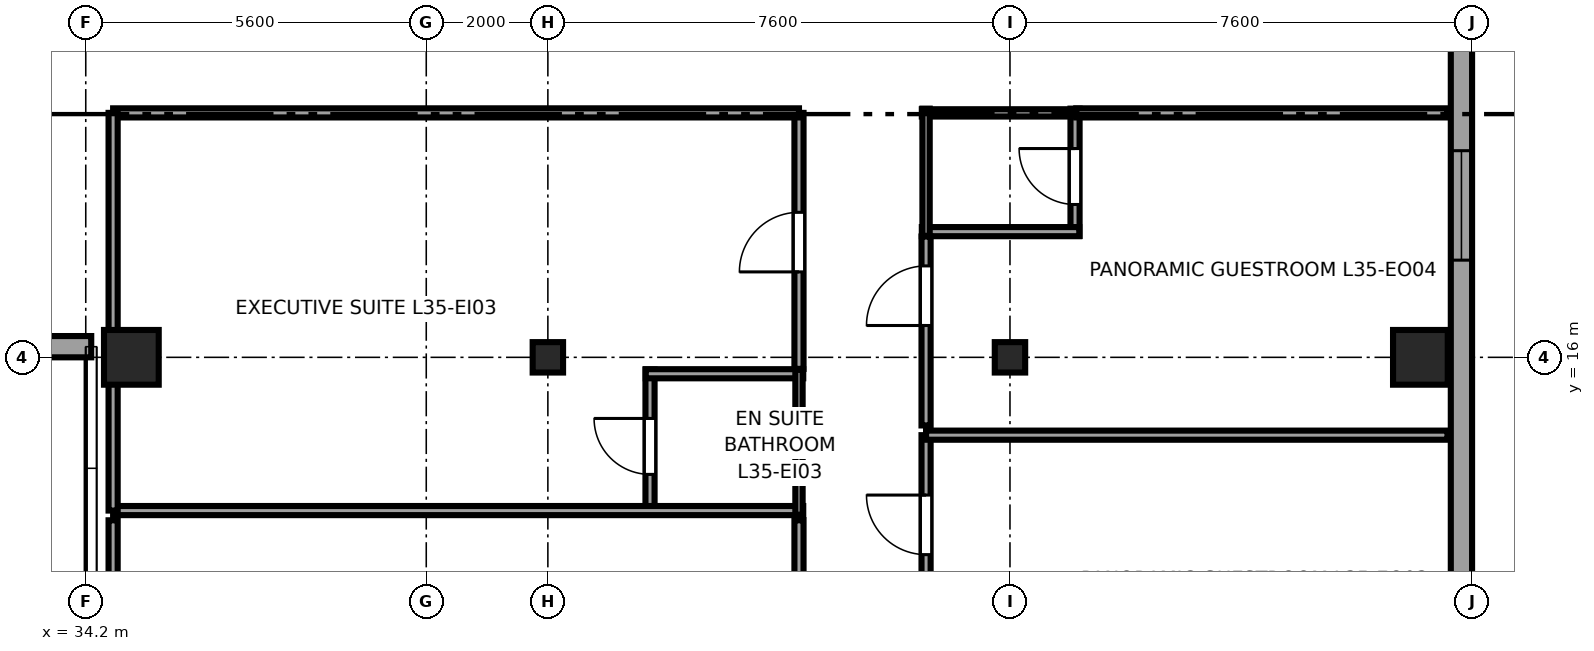
"""IFC4 building model, lengths in metres.
Left out: names, types, materials, properties, quantities, classifications, styles, units other than length and angle.
Written with IfcOpenShell. Run it as: python <this file> out.ifc"""

import sys

from ifc_helpers import new_model, si_unit, direction, frame, frame_2d, origin, origin_2d, place, context, subcontext, project, spatial, rectangle, i_section, extrude, source, transform, mapped, element, fill, save


model = new_model("IFC4")
c1 = context("Model", 3, precision=1e-05, world=origin(), true_north=direction((0.0, 1.0)))
c2 = subcontext(c1, "Body", "Model", "MODEL_VIEW")
j1 = project(units=[si_unit("LENGTHUNIT", "METRE"), si_unit("PLANEANGLEUNIT", "RADIAN")], contexts=[c1])
p1 = place(None, origin())
s1 = spatial("IfcSite", under=j1, at=p1, CompositionType="ELEMENT")
p2 = place(p1, origin())
s2 = spatial("IfcBuilding", under=s1, at=p2, CompositionType="ELEMENT")
p3 = place(p2, frame((0.0, 0.0, 136.4)))
s3 = spatial("IfcBuildingStorey", under=s2, at=p3, CompositionType="ELEMENT", Elevation=136.4)
m1 = source(origin(), c2, "Body", "SweptSolid", [
    extrude(rectangle(XDim=0.9, YDim=0.9, at=origin_2d()), origin(), (0.0, 0.0, 1.0), 3.55),
])
p4 = place(p3, frame((34.95, 16.0, 0.0), z_axis=(0.0, 0.0, 1.0), x_axis=(1.0, 0.0, 0.0)))
e1 = element("IfcColumn", 1, at=p4, inside=s3, PredefinedType="COLUMN", context=c2, shape_type="MappedRepresentation", body=[
    mapped(m1, transform((0.0, 0.0, 0.0), x_axis=(1.0, 0.0, 0.0), y_axis=(0.0, 1.0, 0.0), z_axis=(0.0, 0.0, 1.0), scale=1.0)),
])
m2 = source(origin(), c2, "Body", "SweptSolid", [
    extrude(i_section(OverallWidth=0.5, OverallDepth=0.5, WebThickness=0.022, FlangeThickness=0.034, at=origin_2d()), origin(), (0.0, 0.0, 1.0), 3.55),
])
for number, where, z_axis, x_axis in (
    (2, (41.8, 16.0, 0.0), (0.0, 0.0, 1.0), (1.0, 0.0, 0.0)),
    (3, (49.4, 16.0, 0.0), (0.0, 0.0, 1.0), (1.0, 0.0, 0.0)),
):
    element("IfcColumn", number, at=place(p3, frame(where, z_axis=z_axis, x_axis=x_axis)), inside=s3, PredefinedType="COLUMN", context=c2, shape_type="MappedRepresentation", body=[
        mapped(m2, transform((0.0, 0.0, 0.0), x_axis=(1.0, 0.0, 0.0), y_axis=(0.0, 1.0, 0.0), z_axis=(0.0, 0.0, 1.0), scale=1.0)),
    ])
p5 = place(p3, frame((56.15, 16.0, 0.0), z_axis=(0.0, 0.0, 1.0), x_axis=(1.0, 0.0, 0.0)))
e4 = element("IfcColumn", 4, at=p5, inside=s3, PredefinedType="COLUMN", context=c2, shape_type="MappedRepresentation", body=[
    mapped(m1, transform((0.0, 0.0, 0.0), x_axis=(1.0, 0.0, 0.0), y_axis=(0.0, 1.0, 0.0), z_axis=(0.0, 0.0, 1.0), scale=1.0)),
])
p6 = place(p3, frame((22.71, 16.175, 0.0), z_axis=(0.0, 0.0, 1.0), x_axis=(1.0, 0.0, 0.0)))
e5 = element("IfcWall", 5, at=p6, inside=s3, PredefinedType="SOLIDWALL", context=c2, shape_type="SweptSolid", body=[
    extrude(rectangle(XDim=11.58, YDim=0.35, at=frame_2d((5.79, 0.0))), origin(), (0.0, 0.0, 1.0), 2.748),
])
p7 = place(p6, frame((2.295, 0.0, 0.68)))
e6 = element("IfcOpeningElement", 6, at=p7, cuts=e5, PredefinedType="OPENING", context=c2, shape_type="SweptSolid", body=[
    extrude(rectangle(XDim=1.8, YDim=1.85, at=frame_2d((0.9, 0.925))), frame((0.0, 0.185, 0.0), z_axis=(0.0, -1.0, 0.0), x_axis=(1.0, 0.0, 0.0)), (0.0, 0.0, 1.0), 0.37),
])
p8 = place(p6, frame((7.485, 0.0, 0.68)))
e7 = element("IfcOpeningElement", 7, at=p8, cuts=e5, PredefinedType="OPENING", context=c2, shape_type="SweptSolid", body=[
    extrude(rectangle(XDim=1.8, YDim=1.85, at=frame_2d((0.9, 0.925))), frame((0.0, 0.185, 0.0), z_axis=(0.0, -1.0, 0.0), x_axis=(1.0, 0.0, 0.0)), (0.0, 0.0, 1.0), 0.37),
])
p9 = place(p3, frame((56.825, 4.617, 0.0), z_axis=(0.0, 0.0, 1.0), x_axis=(0.0, 1.0, 0.0)))
e8 = element("IfcWall", 8, at=p9, inside=s3, PredefinedType="SOLIDWALL", context=c2, shape_type="SweptSolid", body=[
    extrude(rectangle(XDim=36.766, YDim=0.35, at=frame_2d((18.383, 0.0))), origin(), (0.0, 0.0, 1.0), 3.37),
])
p10 = place(p9, frame((0.626, 0.0, 0.68)))
e9 = element("IfcOpeningElement", 9, at=p10, cuts=e8, PredefinedType="OPENING", context=c2, shape_type="SweptSolid", body=[
    extrude(rectangle(XDim=1.8, YDim=1.85, at=frame_2d((0.9, 0.925))), frame((0.0, 0.185, 0.0), z_axis=(0.0, -1.0, 0.0), x_axis=(1.0, 0.0, 0.0)), (0.0, 0.0, 1.0), 0.37),
])
p11 = place(p9, frame((5.628, 0.0, 0.68)))
e10 = element("IfcOpeningElement", 10, at=p11, cuts=e8, PredefinedType="OPENING", context=c2, shape_type="SweptSolid", body=[
    extrude(rectangle(XDim=1.8, YDim=1.85, at=frame_2d((0.9, 0.925))), frame((0.0, 0.185, 0.0), z_axis=(0.0, -1.0, 0.0), x_axis=(1.0, 0.0, 0.0)), (0.0, 0.0, 1.0), 0.37),
])
p12 = place(p9, frame((12.981, 0.0, 0.68)))
e11 = element("IfcOpeningElement", 11, at=p12, cuts=e8, PredefinedType="OPENING", context=c2, shape_type="SweptSolid", body=[
    extrude(rectangle(XDim=1.8, YDim=1.85, at=frame_2d((0.9, 0.925))), frame((0.0, 0.185, 0.0), z_axis=(0.0, -1.0, 0.0), x_axis=(1.0, 0.0, 0.0)), (0.0, 0.0, 1.0), 0.37),
])
p13 = place(p9, frame((21.435, 0.0, 0.68)))
e12 = element("IfcOpeningElement", 12, at=p13, cuts=e8, PredefinedType="OPENING", context=c2, shape_type="SweptSolid", body=[
    extrude(rectangle(XDim=1.8, YDim=1.85, at=frame_2d((0.9, 0.925))), frame((0.0, 0.185, 0.0), z_axis=(0.0, -1.0, 0.0), x_axis=(1.0, 0.0, 0.0)), (0.0, 0.0, 1.0), 0.37),
])
p14 = place(p9, frame((30.388, 0.0, 0.68)))
e13 = element("IfcOpeningElement", 13, at=p14, cuts=e8, PredefinedType="OPENING", context=c2, shape_type="SweptSolid", body=[
    extrude(rectangle(XDim=1.8, YDim=1.85, at=frame_2d((0.9, 0.925))), frame((0.0, 0.185, 0.0), z_axis=(0.0, -1.0, 0.0), x_axis=(1.0, 0.0, 0.0)), (0.0, 0.0, 1.0), 0.37),
])
p15 = place(p3, frame((43.48, 13.41, 0.0), z_axis=(0.0, 0.0, 1.0), x_axis=(0.0, 1.0, 0.0)))
e14 = element("IfcWall", 14, at=p15, inside=s3, PredefinedType="PARTITIONING", context=c2, shape_type="SweptSolid", body=[
    extrude(rectangle(XDim=2.39, YDim=0.15, at=frame_2d((1.195, 0.0))), origin(), (0.0, 0.0, 1.0), 3.37),
])
p16 = place(p15, frame((0.665, 0.0, 0.0)))
e15 = element("IfcOpeningElement", 15, at=p16, cuts=e14, PredefinedType="OPENING", context=c2, shape_type="SweptSolid", body=[
    extrude(rectangle(XDim=0.92, YDim=2.01, at=frame_2d((0.46, 1.005))), frame((0.0, 0.085, 0.0), z_axis=(0.0, -1.0, 0.0), x_axis=(1.0, 0.0, 0.0)), (0.0, 0.0, 1.0), 0.17),
])
p17 = place(p3, frame((34.65, 13.48, 0.0), z_axis=(0.0, 0.0, 1.0), x_axis=(1.0, 0.0, 0.0)))
e16 = element("IfcWall", 16, at=p17, inside=s3, PredefinedType="PARTITIONING", context=c2, shape_type="SweptSolid", body=[
    extrude(rectangle(XDim=11.35, YDim=0.15, at=frame_2d((5.675, 0.0))), origin(), (0.0, 0.0, 1.0), 3.37),
])
p18 = place(p3, frame((43.41, 15.73, 0.0), z_axis=(0.0, 0.0, 1.0), x_axis=(1.0, 0.0, 0.0)))
e17 = element("IfcWall", 17, at=p18, inside=s3, PredefinedType="PARTITIONING", context=c2, shape_type="SweptSolid", body=[
    extrude(rectangle(XDim=2.59, YDim=0.15, at=frame_2d((1.295, 0.0))), origin(), (0.0, 0.0, 1.0), 3.37),
])
p19 = place(p3, frame((45.93, 13.41, 0.0), z_axis=(0.0, 0.0, 1.0), x_axis=(0.0, 1.0, 0.0)))
e18 = element("IfcWall", 18, at=p19, inside=s3, PredefinedType="PLUMBINGWALL", context=c2, shape_type="SweptSolid", body=[
    extrude(rectangle(XDim=2.39, YDim=0.12, at=frame_2d((1.195, 0.0))), origin(), (0.0, 0.0, 1.0), 3.37),
])
p20 = place(p3, frame((50.47, 17.997, 0.0), z_axis=(0.0, 0.0, 1.0), x_axis=(0.0, 1.0, 0.0)))
e19 = element("IfcWall", 19, at=p20, inside=s3, PredefinedType="PARTITIONING", context=c2, shape_type="SweptSolid", body=[
    extrude(rectangle(XDim=2.093, YDim=0.15, at=frame_2d((1.046, 0.0))), origin(), (0.0, 0.0, 1.0), 3.37),
])
p21 = place(p20, frame((0.517, 0.0, 0.0)))
e20 = element("IfcOpeningElement", 20, at=p21, cuts=e19, PredefinedType="OPENING", context=c2, shape_type="SweptSolid", body=[
    extrude(rectangle(XDim=0.92, YDim=2.01, at=frame_2d((0.46, 1.005))), frame((0.0, 0.085, 0.0), z_axis=(0.0, -1.0, 0.0), x_axis=(1.0, 0.0, 0.0)), (0.0, 0.0, 1.0), 0.17),
])
p22 = place(p3, frame((47.95, 18.067, 0.0), z_axis=(0.0, 0.0, 1.0), x_axis=(1.0, 0.0, 0.0)))
e21 = element("IfcWall", 21, at=p22, inside=s3, PredefinedType="PARTITIONING", context=c2, shape_type="SweptSolid", body=[
    extrude(rectangle(XDim=2.59, YDim=0.15, at=frame_2d((1.295, 0.0))), origin(), (0.0, 0.0, 1.0), 3.37),
])
p23 = place(p3, frame((47.95, 20.02, 0.0), z_axis=(0.0, 0.0, 1.0), x_axis=(1.0, 0.0, 0.0)))
e22 = element("IfcWall", 22, at=p23, inside=s3, PredefinedType="PLUMBINGWALL", context=c2, shape_type="SweptSolid", body=[
    extrude(rectangle(XDim=2.59, YDim=0.12, at=frame_2d((1.295, 0.0))), origin(), (0.0, 0.0, 1.0), 3.37),
])
p24 = place(p3, frame((48.02, 17.997, 0.0), z_axis=(0.0, 0.0, 1.0), x_axis=(0.0, 1.0, 0.0)))
e23 = element("IfcWall", 23, at=p24, inside=s3, PredefinedType="PLUMBINGWALL", context=c2, shape_type="SweptSolid", body=[
    extrude(rectangle(XDim=2.093, YDim=0.12, at=frame_2d((1.046, 0.0))), origin(), (0.0, 0.0, 1.0), 3.37),
])
p25 = place(p3, frame((45.93, 9.01, 0.0), z_axis=(0.0, 0.0, 1.0), x_axis=(0.0, 1.0, 0.0)))
e24 = element("IfcWall", 24, at=p25, inside=s3, PredefinedType="PARTITIONING", context=c2, shape_type="SweptSolid", body=[
    extrude(rectangle(XDim=4.31, YDim=0.15, at=frame_2d((2.155, 0.0))), origin(), (0.0, 0.0, 1.0), 3.37),
])
p26 = place(p25, frame((1.645, 0.0, 0.0)))
e25 = element("IfcOpeningElement", 25, at=p26, cuts=e24, PredefinedType="OPENING", context=c2, shape_type="SweptSolid", body=[
    extrude(rectangle(XDim=0.98, YDim=2.12, at=frame_2d((0.49, 1.06))), frame((0.0, 0.085, 0.0), z_axis=(0.0, -1.0, 0.0), x_axis=(1.0, 0.0, 0.0)), (0.0, 0.0, 1.0), 0.17),
])
p27 = place(p3, frame((34.65, 6.68, 0.0), z_axis=(0.0, 0.0, 1.0), x_axis=(0.0, 1.0, 0.0)))
e26 = element("IfcWall", 26, at=p27, inside=s3, PredefinedType="PARTITIONING", context=c2, shape_type="SweptSolid", body=[
    extrude(rectangle(XDim=6.64, YDim=0.15, at=frame_2d((3.32, 0.0))), origin(), (0.0, 0.0, 1.0), 3.37),
])
p28 = place(p3, frame((45.93, 15.81, 0.0), z_axis=(0.0, 0.0, 1.0), x_axis=(0.0, 1.0, 0.0)))
e27 = element("IfcWall", 27, at=p28, inside=s3, PredefinedType="PARTITIONING", context=c2, shape_type="SweptSolid", body=[
    extrude(rectangle(XDim=4.21, YDim=0.15, at=frame_2d((2.105, 0.0))), origin(), (0.0, 0.0, 1.0), 3.37),
])
p29 = place(p28, frame((1.595, 0.0, 0.0)))
e28 = element("IfcOpeningElement", 28, at=p29, cuts=e27, PredefinedType="OPENING", context=c2, shape_type="SweptSolid", body=[
    extrude(rectangle(XDim=0.98, YDim=2.12, at=frame_2d((0.49, 1.06))), frame((0.0, 0.085, 0.0), z_axis=(0.0, -1.0, 0.0), x_axis=(1.0, 0.0, 0.0)), (0.0, 0.0, 1.0), 0.17),
])
p30 = place(p3, frame((34.65, 20.02, 0.0), z_axis=(0.0, 0.0, 1.0), x_axis=(1.0, 0.0, 0.0)))
e29 = element("IfcWall", 29, at=p30, inside=s3, PredefinedType="PARTITIONING", context=c2, shape_type="SweptSolid", body=[
    extrude(rectangle(XDim=11.28, YDim=0.15, at=frame_2d((5.64, 0.0))), origin(), (0.0, 0.0, 1.0), 2.954),
])
p31 = place(p3, frame((34.65, 13.48, 0.0), z_axis=(0.0, 0.0, 1.0), x_axis=(0.0, 1.0, 0.0)))
e30 = element("IfcWall", 30, at=p31, inside=s3, PredefinedType="PARTITIONING", context=c2, shape_type="SweptSolid", body=[
    extrude(rectangle(XDim=6.54, YDim=0.15, at=frame_2d((3.27, 0.0))), origin(), (0.0, 0.0, 1.0), 3.37),
])
p32 = place(p3, frame((48.02, 11.81, 0.0), z_axis=(0.0, 0.0, 1.0), x_axis=(0.0, 1.0, 0.0)))
e31 = element("IfcWall", 31, at=p32, inside=s3, PredefinedType="PARTITIONING", context=c2, shape_type="SweptSolid", body=[
    extrude(rectangle(XDim=2.91, YDim=0.15, at=frame_2d((1.455, 0.0))), origin(), (0.0, 0.0, 1.0), 3.37),
])
p33 = place(p32, frame((0.945, 0.0, 0.0)))
e32 = element("IfcOpeningElement", 32, at=p33, cuts=e31, PredefinedType="OPENING", context=c2, shape_type="SweptSolid", body=[
    extrude(rectangle(XDim=0.98, YDim=2.12, at=frame_2d((0.49, 1.06))), frame((0.0, 0.085, 0.0), z_axis=(0.0, -1.0, 0.0), x_axis=(1.0, 0.0, 0.0)), (0.0, 0.0, 1.0), 0.17),
])
p34 = place(p3, frame((48.02, 14.72, 0.0), z_axis=(0.0, 0.0, 1.0), x_axis=(1.0, 0.0, 0.0)))
e33 = element("IfcWall", 33, at=p34, inside=s3, PredefinedType="PARTITIONING", context=c2, shape_type="SweptSolid", body=[
    extrude(rectangle(XDim=8.575, YDim=0.15, at=frame_2d((4.288, 0.0))), origin(), (0.0, 0.0, 1.0), 3.37),
])
p35 = place(p3, frame((48.02, 14.88, 0.0), z_axis=(0.0, 0.0, 1.0), x_axis=(0.0, 1.0, 0.0)))
e34 = element("IfcWall", 34, at=p35, inside=s3, PredefinedType="PARTITIONING", context=c2, shape_type="SweptSolid", body=[
    extrude(rectangle(XDim=3.107, YDim=0.15, at=frame_2d((1.554, 0.0))), origin(), (0.0, 0.0, 1.0), 3.37),
])
p36 = place(p35, frame((1.644, 0.0, 0.0)))
e35 = element("IfcOpeningElement", 35, at=p36, cuts=e34, PredefinedType="OPENING", context=c2, shape_type="SweptSolid", body=[
    extrude(rectangle(XDim=0.98, YDim=2.12, at=frame_2d((0.49, 1.06))), frame((0.0, 0.085, 0.0), z_axis=(0.0, -1.0, 0.0), x_axis=(1.0, 0.0, 0.0)), (0.0, 0.0, 1.0), 0.17),
])
p37 = place(p3, frame((50.49, 20.02, 0.0), z_axis=(0.0, 0.0, 1.0), x_axis=(1.0, 0.0, 0.0)))
e36 = element("IfcWall", 36, at=p37, inside=s3, PredefinedType="PARTITIONING", context=c2, shape_type="SweptSolid", body=[
    extrude(rectangle(XDim=6.105, YDim=0.15, at=frame_2d((3.052, 0.0))), origin(), (0.0, 0.0, 1.0), 3.37),
])
m3 = source(origin(), c2, "Body", "SweptSolid", [
    extrude(rectangle(XDim=1.8, YDim=1.85, at=frame_2d((0.9, 0.925))), frame((0.0, 0.09, 0.0), z_axis=(0.0, -1.0, 0.0), x_axis=(1.0, 0.0, 0.0)), (0.0, 0.0, 1.0), 0.06),
])
p38 = place(p12, origin())
e37 = element("IfcWindow", 37, at=p38, inside=s3, PartitioningType="TRIPLE_PANEL_HORIZONTAL", PredefinedType="WINDOW", context=c2, shape_type="MappedRepresentation", body=[
    mapped(m3, transform((0.0, 0.0, 0.0), x_axis=(1.0, 0.0, 0.0), y_axis=(0.0, 1.0, 0.0), z_axis=(0.0, 0.0, 1.0), scale=1.0)),
])
fill(e11, e37)
m4 = source(origin(), c2, "Body", "SweptSolid", [
    extrude(rectangle(XDim=0.92, YDim=2.01, at=frame_2d((0.46, 1.005))), frame((0.0, 0.025, 0.0), z_axis=(0.0, -1.0, 0.0), x_axis=(1.0, 0.0, 0.0)), (0.0, 0.0, 1.0), 0.05),
])
p39 = place(p16, origin())
e38 = element("IfcDoor", 38, at=p39, inside=s3, OperationType="SINGLE_SWING_RIGHT", PredefinedType="DOOR", context=c2, shape_type="MappedRepresentation", body=[
    mapped(m4, transform((0.0, 0.0, 0.0), x_axis=(1.0, 0.0, 0.0), y_axis=(0.0, 1.0, 0.0), z_axis=(0.0, 0.0, 1.0), scale=1.0)),
])
fill(e15, e38)
p40 = place(p21, origin())
e39 = element("IfcDoor", 39, at=p40, inside=s3, OperationType="SINGLE_SWING_RIGHT", PredefinedType="DOOR", context=c2, shape_type="MappedRepresentation", body=[
    mapped(m4, transform((0.0, 0.0, 0.0), x_axis=(1.0, 0.0, 0.0), y_axis=(0.0, 1.0, 0.0), z_axis=(0.0, 0.0, 1.0), scale=1.0)),
])
fill(e20, e39)
m5 = source(origin(), c2, "Body", "SweptSolid", [
    extrude(rectangle(XDim=0.98, YDim=2.12, at=frame_2d((0.49, 1.06))), frame((0.0, 0.025, 0.0), z_axis=(0.0, -1.0, 0.0), x_axis=(1.0, 0.0, 0.0)), (0.0, 0.0, 1.0), 0.05),
])
p41 = place(p29, origin())
e40 = element("IfcDoor", 40, at=p41, inside=s3, OperationType="SINGLE_SWING_LEFT", PredefinedType="DOOR", context=c2, shape_type="MappedRepresentation", body=[
    mapped(m5, transform((0.0, 0.0, 0.0), x_axis=(1.0, 0.0, 0.0), y_axis=(0.0, 1.0, 0.0), z_axis=(0.0, 0.0, 1.0), scale=1.0)),
])
fill(e28, e40)
p42 = place(p33, origin())
e41 = element("IfcDoor", 41, at=p42, inside=s3, OperationType="SINGLE_SWING_RIGHT", PredefinedType="DOOR", context=c2, shape_type="MappedRepresentation", body=[
    mapped(m5, transform((0.0, 0.0, 0.0), x_axis=(1.0, 0.0, 0.0), y_axis=(0.0, 1.0, 0.0), z_axis=(0.0, 0.0, 1.0), scale=1.0)),
])
fill(e32, e41)
p43 = place(p36, origin())
e42 = element("IfcDoor", 42, at=p43, inside=s3, OperationType="SINGLE_SWING_LEFT", PredefinedType="DOOR", context=c2, shape_type="MappedRepresentation", body=[
    mapped(m5, transform((0.0, 0.0, 0.0), x_axis=(1.0, 0.0, 0.0), y_axis=(0.0, 1.0, 0.0), z_axis=(0.0, 0.0, 1.0), scale=1.0)),
])
fill(e35, e42)
save(model, sys.argv[1])
